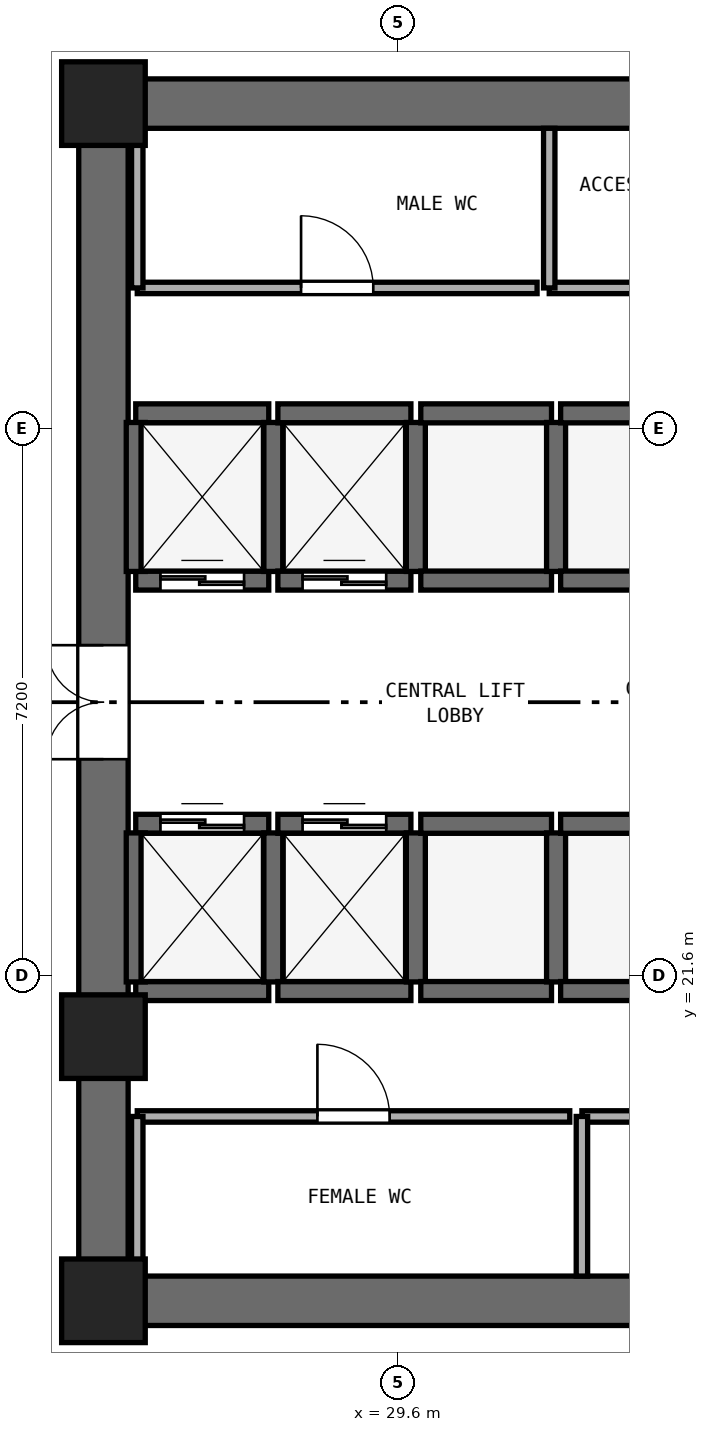
"""IFC4 building model, lengths in metres.
Left out: names, types, materials, properties, quantities, classifications, styles, units other than length and angle.
Written with IfcOpenShell. Run it as: python <this file> out.ifc"""

import sys

from ifc_helpers import new_model, si_unit, direction, frame, frame_2d, origin, origin_2d, place, context, subcontext, project, spatial, rectangle, extrude, element, fill, save


model = new_model("IFC4")
c1 = context("Model", 3, precision=1e-05, world=origin(), true_north=direction((0.0, 1.0)))
c2 = subcontext(c1, "Body", "Model", "MODEL_VIEW")
j1 = project(units=[si_unit("LENGTHUNIT", "METRE"), si_unit("PLANEANGLEUNIT", "RADIAN")], contexts=[c1])
p1 = place(None, origin())
s1 = spatial("IfcSite", under=j1, at=p1, CompositionType="ELEMENT")
p2 = place(p1, origin())
s2 = spatial("IfcBuilding", under=s1, at=p2, CompositionType="ELEMENT")
p3 = place(p2, frame((0.0, 0.0, 15.0)))
s3 = spatial("IfcBuildingStorey", under=s2, at=p3, CompositionType="ELEMENT", Elevation=15.0)
for number, where, z_axis, x_axis in (
    (1, (25.4, 17.325, 0.0), (0.0, 0.0, 1.0), (1.0, 0.0, 0.0)),
    (2, (25.4, 33.075, 0.0), (0.0, 0.0, 1.0), (1.0, 0.0, 0.0)),
):
    element("IfcWall", number, at=place(p3, frame(where, z_axis=z_axis, x_axis=x_axis)), inside=s3, PredefinedType="SHEAR", context=c2, shape_type="SweptSolid", body=[
        extrude(rectangle(XDim=23.2, YDim=0.65, at=frame_2d((11.6, 0.0))), origin(), (0.0, 0.0, 1.0), 4.68),
    ])
p4 = place(p3, frame((25.725, 17.65, 0.0), z_axis=(0.0, 0.0, 1.0), x_axis=(0.0, 1.0, 0.0)))
e3 = element("IfcWall", 3, at=p4, inside=s3, PredefinedType="SHEAR", context=c2, shape_type="SweptSolid", body=[
    extrude(rectangle(XDim=15.1, YDim=0.65, at=frame_2d((7.55, 0.0))), origin(), (0.0, 0.0, 1.0), 4.68),
])
p5 = place(p4, frame((6.8, 0.0, 0.0)))
e4 = element("IfcOpeningElement", 4, at=p5, cuts=e3, PredefinedType="OPENING", context=c2, shape_type="SweptSolid", body=[
    extrude(rectangle(XDim=1.5, YDim=2.15, at=frame_2d((0.75, 1.075))), frame((0.0, 0.335, 0.0), z_axis=(0.0, -1.0, 0.0), x_axis=(1.0, 0.0, 0.0)), (0.0, 0.0, 1.0), 0.67),
])
for number, where, z_axis, x_axis in (
    (5, (25.725, 17.325, 0.0), (0.0, 0.0, 1.0), (1.0, 0.0, 0.0)),
    (6, (25.725, 33.075, 0.0), (0.0, 0.0, 1.0), (1.0, 0.0, 0.0)),
    (7, (25.725, 20.8, 0.0), (0.0, 0.0, 1.0), (1.0, 0.0, 0.0)),
):
    element("IfcColumn", number, at=place(p3, frame(where, z_axis=z_axis, x_axis=x_axis)), inside=s3, PredefinedType="PILASTER", context=c2, shape_type="SweptSolid", body=[
        extrude(rectangle(XDim=1.1, YDim=1.1, at=origin_2d()), origin(), (0.0, 0.0, 1.0), 5.0),
    ])
p6 = place(p3, frame((26.15, 26.8, 0.0), z_axis=(0.0, 0.0, 1.0), x_axis=(1.0, 0.0, 0.0)))
e8 = element("IfcWall", 8, at=p6, inside=s3, PredefinedType="SHEAR", context=c2, shape_type="SweptSolid", body=[
    extrude(rectangle(XDim=1.75, YDim=0.25, at=frame_2d((0.875, 0.0))), origin(), (0.0, 0.0, 1.0), 4.68),
])
p7 = place(p6, frame((0.325, 0.0, 0.0)))
e9 = element("IfcOpeningElement", 9, at=p7, cuts=e8, PredefinedType="OPENING", context=c2, shape_type="SweptSolid", body=[
    extrude(rectangle(XDim=1.1, YDim=2.15, at=frame_2d((0.55, 1.075))), frame((0.0, 0.135, 0.0), z_axis=(0.0, -1.0, 0.0), x_axis=(1.0, 0.0, 0.0)), (0.0, 0.0, 1.0), 0.27),
])
p8 = place(p3, frame((26.15, 29.0, 0.0), z_axis=(0.0, 0.0, 1.0), x_axis=(1.0, 0.0, 0.0)))
e10 = element("IfcWall", 10, at=p8, inside=s3, PredefinedType="SHEAR", context=c2, shape_type="SweptSolid", body=[
    extrude(rectangle(XDim=1.75, YDim=0.25, at=frame_2d((0.875, 0.0))), origin(), (0.0, 0.0, 1.0), 4.68),
])
for number, where, z_axis, x_axis in (
    (11, (26.15, 26.92, 0.0), (0.0, 0.0, 1.0), (0.0, 1.0, 0.0)),
    (12, (27.96, 26.92, 0.0), (0.0, 0.0, 1.0), (0.0, 1.0, 0.0)),
):
    element("IfcWall", number, at=place(p3, frame(where, z_axis=z_axis, x_axis=x_axis)), inside=s3, PredefinedType="SHEAR", context=c2, shape_type="SweptSolid", body=[
        extrude(rectangle(XDim=1.96, YDim=0.25, at=frame_2d((0.98, 0.0))), origin(), (0.0, 0.0, 1.0), 4.68),
    ])
p9 = place(p3, frame((28.02, 26.8, 0.0), z_axis=(0.0, 0.0, 1.0), x_axis=(1.0, 0.0, 0.0)))
e13 = element("IfcWall", 13, at=p9, inside=s3, PredefinedType="SHEAR", context=c2, shape_type="SweptSolid", body=[
    extrude(rectangle(XDim=1.75, YDim=0.25, at=frame_2d((0.875, 0.0))), origin(), (0.0, 0.0, 1.0), 4.68),
])
p10 = place(p9, frame((0.325, 0.0, 0.0)))
e14 = element("IfcOpeningElement", 14, at=p10, cuts=e13, PredefinedType="OPENING", context=c2, shape_type="SweptSolid", body=[
    extrude(rectangle(XDim=1.1, YDim=2.15, at=frame_2d((0.55, 1.075))), frame((0.0, 0.135, 0.0), z_axis=(0.0, -1.0, 0.0), x_axis=(1.0, 0.0, 0.0)), (0.0, 0.0, 1.0), 0.27),
])
p11 = place(p3, frame((28.02, 29.0, 0.0), z_axis=(0.0, 0.0, 1.0), x_axis=(1.0, 0.0, 0.0)))
e15 = element("IfcWall", 15, at=p11, inside=s3, PredefinedType="SHEAR", context=c2, shape_type="SweptSolid", body=[
    extrude(rectangle(XDim=1.75, YDim=0.25, at=frame_2d((0.875, 0.0))), origin(), (0.0, 0.0, 1.0), 4.68),
])
p12 = place(p3, frame((29.835, 26.92, 0.0), z_axis=(0.0, 0.0, 1.0), x_axis=(0.0, 1.0, 0.0)))
e16 = element("IfcWall", 16, at=p12, inside=s3, PredefinedType="SHEAR", context=c2, shape_type="SweptSolid", body=[
    extrude(rectangle(XDim=1.96, YDim=0.25, at=frame_2d((0.98, 0.0))), origin(), (0.0, 0.0, 1.0), 4.68),
])
p13 = place(p3, frame((26.15, 21.4, 0.0), z_axis=(0.0, 0.0, 1.0), x_axis=(1.0, 0.0, 0.0)))
e17 = element("IfcWall", 17, at=p13, inside=s3, PredefinedType="SHEAR", context=c2, shape_type="SweptSolid", body=[
    extrude(rectangle(XDim=1.75, YDim=0.25, at=frame_2d((0.875, 0.0))), origin(), (0.0, 0.0, 1.0), 4.68),
])
p14 = place(p3, frame((26.15, 23.6, 0.0), z_axis=(0.0, 0.0, 1.0), x_axis=(1.0, 0.0, 0.0)))
e18 = element("IfcWall", 18, at=p14, inside=s3, PredefinedType="SHEAR", context=c2, shape_type="SweptSolid", body=[
    extrude(rectangle(XDim=1.75, YDim=0.25, at=frame_2d((0.875, 0.0))), origin(), (0.0, 0.0, 1.0), 4.68),
])
p15 = place(p14, frame((0.325, 0.0, 0.0)))
e19 = element("IfcOpeningElement", 19, at=p15, cuts=e18, PredefinedType="OPENING", context=c2, shape_type="SweptSolid", body=[
    extrude(rectangle(XDim=1.1, YDim=2.15, at=frame_2d((0.55, 1.075))), frame((0.0, 0.135, 0.0), z_axis=(0.0, -1.0, 0.0), x_axis=(1.0, 0.0, 0.0)), (0.0, 0.0, 1.0), 0.27),
])
for number, where, z_axis, x_axis in (
    (20, (26.15, 21.52, 0.0), (0.0, 0.0, 1.0), (0.0, 1.0, 0.0)),
    (21, (27.96, 21.52, 0.0), (0.0, 0.0, 1.0), (0.0, 1.0, 0.0)),
):
    element("IfcWall", number, at=place(p3, frame(where, z_axis=z_axis, x_axis=x_axis)), inside=s3, PredefinedType="SHEAR", context=c2, shape_type="SweptSolid", body=[
        extrude(rectangle(XDim=1.96, YDim=0.25, at=frame_2d((0.98, 0.0))), origin(), (0.0, 0.0, 1.0), 4.68),
    ])
p16 = place(p3, frame((28.02, 21.4, 0.0), z_axis=(0.0, 0.0, 1.0), x_axis=(1.0, 0.0, 0.0)))
e22 = element("IfcWall", 22, at=p16, inside=s3, PredefinedType="SHEAR", context=c2, shape_type="SweptSolid", body=[
    extrude(rectangle(XDim=1.75, YDim=0.25, at=frame_2d((0.875, 0.0))), origin(), (0.0, 0.0, 1.0), 4.68),
])
p17 = place(p3, frame((28.02, 23.6, 0.0), z_axis=(0.0, 0.0, 1.0), x_axis=(1.0, 0.0, 0.0)))
e23 = element("IfcWall", 23, at=p17, inside=s3, PredefinedType="SHEAR", context=c2, shape_type="SweptSolid", body=[
    extrude(rectangle(XDim=1.75, YDim=0.25, at=frame_2d((0.875, 0.0))), origin(), (0.0, 0.0, 1.0), 4.68),
])
p18 = place(p17, frame((0.325, 0.0, 0.0)))
e24 = element("IfcOpeningElement", 24, at=p18, cuts=e23, PredefinedType="OPENING", context=c2, shape_type="SweptSolid", body=[
    extrude(rectangle(XDim=1.1, YDim=2.15, at=frame_2d((0.55, 1.075))), frame((0.0, 0.135, 0.0), z_axis=(0.0, -1.0, 0.0), x_axis=(1.0, 0.0, 0.0)), (0.0, 0.0, 1.0), 0.27),
])
p19 = place(p3, frame((29.835, 21.52, 0.0), z_axis=(0.0, 0.0, 1.0), x_axis=(0.0, 1.0, 0.0)))
e25 = element("IfcWall", 25, at=p19, inside=s3, PredefinedType="SHEAR", context=c2, shape_type="SweptSolid", body=[
    extrude(rectangle(XDim=1.96, YDim=0.25, at=frame_2d((0.98, 0.0))), origin(), (0.0, 0.0, 1.0), 4.68),
])
for number, where, z_axis, x_axis in (
    (26, (29.9, 21.4, 0.0), (0.0, 0.0, 1.0), (1.0, 0.0, 0.0)),
    (27, (29.9, 23.6, 0.0), (0.0, 0.0, 1.0), (1.0, 0.0, 0.0)),
):
    element("IfcWall", number, at=place(p3, frame(where, z_axis=z_axis, x_axis=x_axis)), inside=s3, PredefinedType="SHEAR", context=c2, shape_type="SweptSolid", body=[
        extrude(rectangle(XDim=1.72, YDim=0.25, at=frame_2d((0.86, 0.0))), origin(), (0.0, 0.0, 1.0), 4.68),
    ])
p20 = place(p3, frame((31.68, 21.52, 0.0), z_axis=(0.0, 0.0, 1.0), x_axis=(0.0, 1.0, 0.0)))
e28 = element("IfcWall", 28, at=p20, inside=s3, PredefinedType="SHEAR", context=c2, shape_type="SweptSolid", body=[
    extrude(rectangle(XDim=1.96, YDim=0.25, at=frame_2d((0.98, 0.0))), origin(), (0.0, 0.0, 1.0), 4.68),
])
for number, where, z_axis, x_axis in (
    (29, (31.74, 21.4, 0.0), (0.0, 0.0, 1.0), (1.0, 0.0, 0.0)),
    (30, (31.74, 23.6, 0.0), (0.0, 0.0, 1.0), (1.0, 0.0, 0.0)),
):
    element("IfcWall", number, at=place(p3, frame(where, z_axis=z_axis, x_axis=x_axis)), inside=s3, PredefinedType="SHEAR", context=c2, shape_type="SweptSolid", body=[
        extrude(rectangle(XDim=1.72, YDim=0.25, at=frame_2d((0.86, 0.0))), origin(), (0.0, 0.0, 1.0), 4.68),
    ])
for number, where, z_axis, x_axis in (
    (31, (29.9, 26.8, 0.0), (0.0, 0.0, 1.0), (1.0, 0.0, 0.0)),
    (32, (29.9, 29.0, 0.0), (0.0, 0.0, 1.0), (1.0, 0.0, 0.0)),
):
    element("IfcWall", number, at=place(p3, frame(where, z_axis=z_axis, x_axis=x_axis)), inside=s3, PredefinedType="SHEAR", context=c2, shape_type="SweptSolid", body=[
        extrude(rectangle(XDim=1.72, YDim=0.25, at=frame_2d((0.86, 0.0))), origin(), (0.0, 0.0, 1.0), 4.68),
    ])
p21 = place(p3, frame((31.68, 26.92, 0.0), z_axis=(0.0, 0.0, 1.0), x_axis=(0.0, 1.0, 0.0)))
e33 = element("IfcWall", 33, at=p21, inside=s3, PredefinedType="SHEAR", context=c2, shape_type="SweptSolid", body=[
    extrude(rectangle(XDim=1.96, YDim=0.25, at=frame_2d((0.98, 0.0))), origin(), (0.0, 0.0, 1.0), 4.68),
])
for number, where, z_axis, x_axis in (
    (34, (31.74, 26.8, 0.0), (0.0, 0.0, 1.0), (1.0, 0.0, 0.0)),
    (35, (31.74, 29.0, 0.0), (0.0, 0.0, 1.0), (1.0, 0.0, 0.0)),
):
    element("IfcWall", number, at=place(p3, frame(where, z_axis=z_axis, x_axis=x_axis)), inside=s3, PredefinedType="SHEAR", context=c2, shape_type="SweptSolid", body=[
        extrude(rectangle(XDim=1.72, YDim=0.25, at=frame_2d((0.86, 0.0))), origin(), (0.0, 0.0, 1.0), 4.68),
    ])
p22 = place(p3, frame((26.17, 30.65, 0.0), z_axis=(0.0, 0.0, 1.0), x_axis=(1.0, 0.0, 0.0)))
e36 = element("IfcWall", 36, at=p22, inside=s3, PredefinedType="PARTITIONING", context=c2, shape_type="SweptSolid", body=[
    extrude(rectangle(XDim=5.26, YDim=0.15, at=frame_2d((2.63, 0.0))), origin(), (0.0, 0.0, 1.0), 4.68),
])
p23 = place(p22, frame((2.155, 0.0, 0.0)))
e37 = element("IfcOpeningElement", 37, at=p23, cuts=e36, PredefinedType="OPENING", context=c2, shape_type="SweptSolid", body=[
    extrude(rectangle(XDim=0.95, YDim=2.1, at=frame_2d((0.475, 1.05))), frame((0.0, 0.085, 0.0), z_axis=(0.0, -1.0, 0.0), x_axis=(1.0, 0.0, 0.0)), (0.0, 0.0, 1.0), 0.17),
])
p24 = place(p3, frame((26.17, 30.65, 0.0), z_axis=(0.0, 0.0, 1.0), x_axis=(0.0, 1.0, 0.0)))
e38 = element("IfcWall", 38, at=p24, inside=s3, PredefinedType="PARTITIONING", context=c2, shape_type="SweptSolid", body=[
    extrude(rectangle(XDim=2.1, YDim=0.15, at=frame_2d((1.05, 0.0))), origin(), (0.0, 0.0, 1.0), 4.68),
])
p25 = place(p3, frame((31.59, 30.65, 0.0), z_axis=(0.0, 0.0, 1.0), x_axis=(1.0, 0.0, 0.0)))
e39 = element("IfcWall", 39, at=p25, inside=s3, PredefinedType="PARTITIONING", context=c2, shape_type="SweptSolid", body=[
    extrude(rectangle(XDim=5.26, YDim=0.15, at=frame_2d((2.63, 0.0))), origin(), (0.0, 0.0, 1.0), 4.68),
])
p26 = place(p25, frame((2.155, 0.0, 0.0)))
e40 = element("IfcOpeningElement", 40, at=p26, cuts=e39, PredefinedType="OPENING", context=c2, shape_type="SweptSolid", body=[
    extrude(rectangle(XDim=0.95, YDim=2.1, at=frame_2d((0.475, 1.05))), frame((0.0, 0.085, 0.0), z_axis=(0.0, -1.0, 0.0), x_axis=(1.0, 0.0, 0.0)), (0.0, 0.0, 1.0), 0.17),
])
p27 = place(p3, frame((31.59, 30.65, 0.0), z_axis=(0.0, 0.0, 1.0), x_axis=(0.0, 1.0, 0.0)))
e41 = element("IfcWall", 41, at=p27, inside=s3, PredefinedType="PARTITIONING", context=c2, shape_type="SweptSolid", body=[
    extrude(rectangle(XDim=2.1, YDim=0.15, at=frame_2d((1.05, 0.0))), origin(), (0.0, 0.0, 1.0), 4.68),
])
p28 = place(p3, frame((26.17, 19.75, 0.0), z_axis=(0.0, 0.0, 1.0), x_axis=(1.0, 0.0, 0.0)))
e42 = element("IfcWall", 42, at=p28, inside=s3, PredefinedType="PARTITIONING", context=c2, shape_type="SweptSolid", body=[
    extrude(rectangle(XDim=5.69, YDim=0.15, at=frame_2d((2.845, 0.0))), origin(), (0.0, 0.0, 1.0), 4.68),
])
p29 = place(p28, frame((2.37, 0.0, 0.0)))
e43 = element("IfcOpeningElement", 43, at=p29, cuts=e42, PredefinedType="OPENING", context=c2, shape_type="SweptSolid", body=[
    extrude(rectangle(XDim=0.95, YDim=2.1, at=frame_2d((0.475, 1.05))), frame((0.0, 0.085, 0.0), z_axis=(0.0, -1.0, 0.0), x_axis=(1.0, 0.0, 0.0)), (0.0, 0.0, 1.0), 0.17),
])
p30 = place(p3, frame((26.17, 17.65, 0.0), z_axis=(0.0, 0.0, 1.0), x_axis=(0.0, 1.0, 0.0)))
e44 = element("IfcWall", 44, at=p30, inside=s3, PredefinedType="PARTITIONING", context=c2, shape_type="SweptSolid", body=[
    extrude(rectangle(XDim=2.1, YDim=0.15, at=frame_2d((1.05, 0.0))), origin(), (0.0, 0.0, 1.0), 4.68),
])
p31 = place(p3, frame((32.02, 19.75, 0.0), z_axis=(0.0, 0.0, 1.0), x_axis=(1.0, 0.0, 0.0)))
e45 = element("IfcWall", 45, at=p31, inside=s3, PredefinedType="PARTITIONING", context=c2, shape_type="SweptSolid", body=[
    extrude(rectangle(XDim=4.83, YDim=0.15, at=frame_2d((2.415, 0.0))), origin(), (0.0, 0.0, 1.0), 4.68),
])
p32 = place(p31, frame((1.965, 0.0, 0.0)))
e46 = element("IfcOpeningElement", 46, at=p32, cuts=e45, PredefinedType="OPENING", context=c2, shape_type="SweptSolid", body=[
    extrude(rectangle(XDim=0.9, YDim=2.1, at=frame_2d((0.45, 1.05))), frame((0.0, 0.085, 0.0), z_axis=(0.0, -1.0, 0.0), x_axis=(1.0, 0.0, 0.0)), (0.0, 0.0, 1.0), 0.17),
])
p33 = place(p3, frame((32.02, 17.65, 0.0), z_axis=(0.0, 0.0, 1.0), x_axis=(0.0, 1.0, 0.0)))
e47 = element("IfcWall", 47, at=p33, inside=s3, PredefinedType="PARTITIONING", context=c2, shape_type="SweptSolid", body=[
    extrude(rectangle(XDim=2.1, YDim=0.15, at=frame_2d((1.05, 0.0))), origin(), (0.0, 0.0, 1.0), 4.68),
])
p34 = place(p7, origin())
e48 = element("IfcDoor", 48, at=p34, inside=s3, OperationType="DOUBLE_DOOR_SLIDING", PredefinedType="DOOR", context=c2, shape_type="SweptSolid", body=[
    extrude(rectangle(XDim=1.1, YDim=2.15, at=frame_2d((0.55, 1.075))), frame((0.0, 0.025, 0.0), z_axis=(0.0, -1.0, 0.0), x_axis=(1.0, 0.0, 0.0)), (0.0, 0.0, 1.0), 0.05),
])
fill(e9, e48)
p35 = place(p10, origin())
e49 = element("IfcDoor", 49, at=p35, inside=s3, OperationType="DOUBLE_DOOR_SLIDING", PredefinedType="DOOR", context=c2, shape_type="SweptSolid", body=[
    extrude(rectangle(XDim=1.1, YDim=2.15, at=frame_2d((0.55, 1.075))), frame((0.0, 0.025, 0.0), z_axis=(0.0, -1.0, 0.0), x_axis=(1.0, 0.0, 0.0)), (0.0, 0.0, 1.0), 0.05),
])
fill(e14, e49)
p36 = place(p15, origin())
e50 = element("IfcDoor", 50, at=p36, inside=s3, OperationType="DOUBLE_DOOR_SLIDING", PredefinedType="DOOR", context=c2, shape_type="SweptSolid", body=[
    extrude(rectangle(XDim=1.1, YDim=2.15, at=frame_2d((0.55, 1.075))), frame((0.0, 0.025, 0.0), z_axis=(0.0, -1.0, 0.0), x_axis=(1.0, 0.0, 0.0)), (0.0, 0.0, 1.0), 0.05),
])
fill(e19, e50)
p37 = place(p18, origin())
e51 = element("IfcDoor", 51, at=p37, inside=s3, OperationType="DOUBLE_DOOR_SLIDING", PredefinedType="DOOR", context=c2, shape_type="SweptSolid", body=[
    extrude(rectangle(XDim=1.1, YDim=2.15, at=frame_2d((0.55, 1.075))), frame((0.0, 0.025, 0.0), z_axis=(0.0, -1.0, 0.0), x_axis=(1.0, 0.0, 0.0)), (0.0, 0.0, 1.0), 0.05),
])
fill(e24, e51)
p38 = place(p5, origin())
e52 = element("IfcDoor", 52, at=p38, inside=s3, OperationType="DOUBLE_DOOR_SINGLE_SWING", PredefinedType="DOOR", context=c2, shape_type="SweptSolid", body=[
    extrude(rectangle(XDim=1.5, YDim=2.15, at=frame_2d((0.75, 1.075))), frame((0.0, 0.025, 0.0), z_axis=(0.0, -1.0, 0.0), x_axis=(1.0, 0.0, 0.0)), (0.0, 0.0, 1.0), 0.05),
])
fill(e4, e52)
p39 = place(p23, origin())
e53 = element("IfcDoor", 53, at=p39, inside=s3, OperationType="SINGLE_SWING_LEFT", PredefinedType="DOOR", context=c2, shape_type="SweptSolid", body=[
    extrude(rectangle(XDim=0.95, YDim=2.1, at=frame_2d((0.475, 1.05))), frame((0.0, 0.025, 0.0), z_axis=(0.0, -1.0, 0.0), x_axis=(1.0, 0.0, 0.0)), (0.0, 0.0, 1.0), 0.05),
])
fill(e37, e53)
p40 = place(p29, origin())
e54 = element("IfcDoor", 54, at=p40, inside=s3, OperationType="SINGLE_SWING_LEFT", PredefinedType="DOOR", context=c2, shape_type="SweptSolid", body=[
    extrude(rectangle(XDim=0.95, YDim=2.1, at=frame_2d((0.475, 1.05))), frame((0.0, 0.025, 0.0), z_axis=(0.0, -1.0, 0.0), x_axis=(1.0, 0.0, 0.0)), (0.0, 0.0, 1.0), 0.05),
])
fill(e43, e54)
save(model, sys.argv[1])
